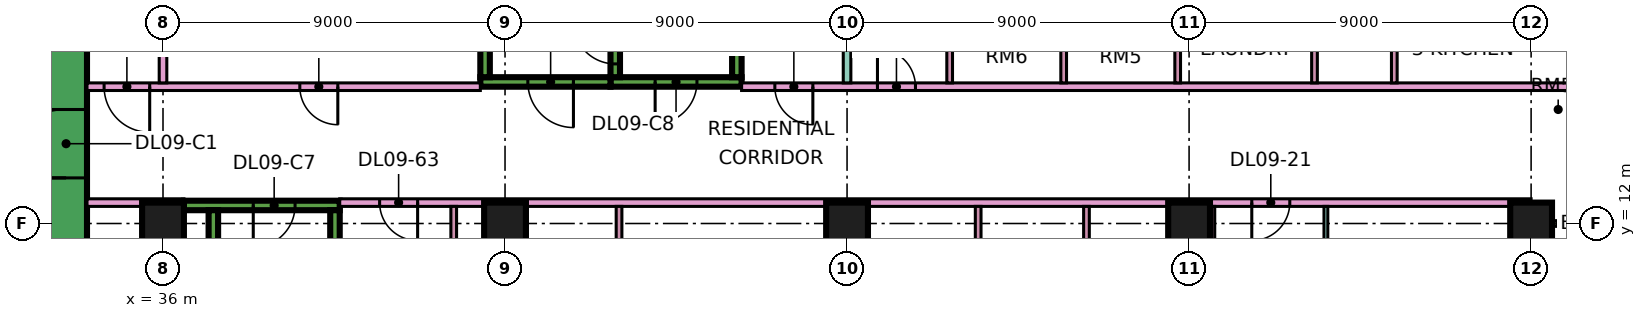
"""IFC4 building model, lengths in metres.
Left out: names, types, materials, properties, quantities, classifications, styles, units other than length and angle.
Written with IfcOpenShell. Run it as: python <this file> out.ifc"""

import sys

from ifc_helpers import new_model, si_unit, direction, frame, frame_2d, origin, origin_2d, place, context, subcontext, project, spatial, rectangle, extrude, element, fill, save


model = new_model("IFC4")
c1 = context("Model", 3, precision=1e-05, world=origin(), true_north=direction((0.0, 1.0)))
c2 = subcontext(c1, "Body", "Model", "MODEL_VIEW")
j1 = project(units=[si_unit("LENGTHUNIT", "METRE"), si_unit("PLANEANGLEUNIT", "RADIAN")], contexts=[c1])
p1 = place(None, origin())
s1 = spatial("IfcSite", under=j1, at=p1, CompositionType="ELEMENT")
p2 = place(p1, origin())
s2 = spatial("IfcBuilding", under=s1, at=p2, CompositionType="ELEMENT")
p3 = place(p2, frame((0.0, 0.0, 48.9)))
s3 = spatial("IfcBuildingStorey", under=s2, at=p3, CompositionType="ELEMENT", Elevation=48.9)
for number, where, z_axis, x_axis in (
    (1, (36.0, 12.0, 0.0), (0.0, 0.0, 1.0), (1.0, 0.0, 0.0)),
    (2, (45.0, 12.0, 0.0), (0.0, 0.0, 1.0), (1.0, 0.0, 0.0)),
    (3, (54.0, 12.0, 0.0), (0.0, 0.0, 1.0), (1.0, 0.0, 0.0)),
    (4, (63.0, 12.0, 0.0), (0.0, 0.0, 1.0), (1.0, 0.0, 0.0)),
    (5, (72.0, 12.0, 0.0), (0.0, 0.0, 1.0), (1.0, 0.0, 0.0)),
):
    element("IfcColumn", number, at=place(p3, frame(where, z_axis=z_axis, x_axis=x_axis)), inside=s3, PredefinedType="COLUMN", context=c2, shape_type="SweptSolid", body=[
        extrude(rectangle(XDim=1.1, YDim=1.1, at=origin_2d()), origin(), (0.0, 0.0, 1.0), 3.75),
    ])
p4 = place(p3, frame((33.45, 8.1, 0.0), z_axis=(0.0, 0.0, 1.0), x_axis=(0.0, 1.0, 0.0)))
e6 = element("IfcWall", 6, at=p4, inside=s3, PredefinedType="SHEAR", context=c2, shape_type="SweptSolid", body=[
    extrude(rectangle(XDim=10.8, YDim=1.1, at=frame_2d((5.4, 0.0))), origin(), (0.0, 0.0, 1.0), 3.75),
])
p5 = place(p4, frame((5.1, 0.0, 0.0)))
e7 = element("IfcOpeningElement", 7, at=p5, cuts=e6, PredefinedType="OPENING", context=c2, shape_type="SweptSolid", body=[
    extrude(rectangle(XDim=1.8, YDim=2.4, at=frame_2d((0.9, 1.2))), frame((0.0, 0.56, 0.0), z_axis=(0.0, -1.0, 0.0), x_axis=(1.0, 0.0, 0.0)), (0.0, 0.0, 1.0), 1.12),
])
p6 = place(p3, frame((36.55, 12.475, 0.0), z_axis=(0.0, 0.0, 1.0), x_axis=(1.0, 0.0, 0.0)))
e8 = element("IfcWall", 8, at=p6, inside=s3, PredefinedType="SHEAR", context=c2, shape_type="SweptSolid", body=[
    extrude(rectangle(XDim=4.1, YDim=0.25, at=frame_2d((2.05, 0.0))), origin(), (0.0, 0.0, 1.0), 3.75),
])
p7 = place(p6, frame((1.825, 0.0, 0.0)))
e9 = element("IfcOpeningElement", 9, at=p7, cuts=e8, PredefinedType="OPENING", context=c2, shape_type="SweptSolid", body=[
    extrude(rectangle(XDim=1.1, YDim=2.2, at=frame_2d((0.55, 1.1))), frame((0.0, 0.135, 0.0), z_axis=(0.0, -1.0, 0.0), x_axis=(1.0, 0.0, 0.0)), (0.0, 0.0, 1.0), 0.27),
])
for number, where, z_axis, x_axis in (
    (10, (37.325, 5.85, 0.0), (0.0, 0.0, 1.0), (0.0, 1.0, 0.0)),
    (11, (40.525, 5.85, 0.0), (0.0, 0.0, 1.0), (0.0, 1.0, 0.0)),
):
    element("IfcWall", number, at=place(p3, frame(where, z_axis=z_axis, x_axis=x_axis)), inside=s3, PredefinedType="SHEAR", context=c2, shape_type="SweptSolid", body=[
        extrude(rectangle(XDim=6.5, YDim=0.25, at=frame_2d((3.25, 0.0))), origin(), (0.0, 0.0, 1.0), 3.75),
    ])
p8 = place(p3, frame((47.775, 15.725, 0.0), z_axis=(0.0, 0.0, 1.0), x_axis=(1.0, 0.0, 0.0)))
e12 = element("IfcWall", 12, at=p8, inside=s3, PredefinedType="SHEAR", context=c2, shape_type="SweptSolid", body=[
    extrude(rectangle(XDim=3.45, YDim=0.25, at=frame_2d((1.725, 0.0))), origin(), (0.0, 0.0, 1.0), 3.75),
])
p9 = place(p8, frame((1.175, 0.0, 0.0)))
e13 = element("IfcOpeningElement", 13, at=p9, cuts=e12, PredefinedType="OPENING", context=c2, shape_type="SweptSolid", body=[
    extrude(rectangle(XDim=1.1, YDim=2.2, at=frame_2d((0.55, 1.1))), frame((0.0, 0.135, 0.0), z_axis=(0.0, -1.0, 0.0), x_axis=(1.0, 0.0, 0.0)), (0.0, 0.0, 1.0), 0.27),
])
p10 = place(p3, frame((47.9, 15.85, 0.0), z_axis=(0.0, 0.0, 1.0), x_axis=(0.0, 1.0, 0.0)))
e14 = element("IfcWall", 14, at=p10, inside=s3, PredefinedType="SHEAR", context=c2, shape_type="SweptSolid", body=[
    extrude(rectangle(XDim=6.5, YDim=0.25, at=frame_2d((3.25, 0.0))), origin(), (0.0, 0.0, 1.0), 3.75),
])
p11 = place(p10, frame((0.35, 0.0, 0.0)))
e15 = element("IfcOpeningElement", 15, at=p11, cuts=e14, PredefinedType="OPENING", context=c2, shape_type="SweptSolid", body=[
    extrude(rectangle(XDim=1.1, YDim=2.2, at=frame_2d((0.55, 1.1))), frame((0.0, 0.135, 0.0), z_axis=(0.0, -1.0, 0.0), x_axis=(1.0, 0.0, 0.0)), (0.0, 0.0, 1.0), 0.27),
])
p12 = place(p3, frame((51.1, 15.85, 0.0), z_axis=(0.0, 0.0, 1.0), x_axis=(0.0, 1.0, 0.0)))
e16 = element("IfcWall", 16, at=p12, inside=s3, PredefinedType="SHEAR", context=c2, shape_type="SweptSolid", body=[
    extrude(rectangle(XDim=6.5, YDim=0.25, at=frame_2d((3.25, 0.0))), origin(), (0.0, 0.0, 1.0), 3.75),
])
p13 = place(p3, frame((44.35, 15.725, 0.0), z_axis=(0.0, 0.0, 1.0), x_axis=(1.0, 0.0, 0.0)))
e17 = element("IfcWall", 17, at=p13, inside=s3, PredefinedType="SHEAR", context=c2, shape_type="SweptSolid", body=[
    extrude(rectangle(XDim=3.425, YDim=0.25, at=frame_2d((1.712, 0.0))), origin(), (0.0, 0.0, 1.0), 3.75),
])
p14 = place(p13, frame((1.25, 0.0, 0.0)))
e18 = element("IfcOpeningElement", 18, at=p14, cuts=e17, PredefinedType="OPENING", context=c2, shape_type="SweptSolid", body=[
    extrude(rectangle(XDim=1.2, YDim=2.2, at=frame_2d((0.6, 1.1))), frame((0.0, 0.135, 0.0), z_axis=(0.0, -1.0, 0.0), x_axis=(1.0, 0.0, 0.0)), (0.0, 0.0, 1.0), 0.27),
])
p15 = place(p3, frame((44.475, 15.85, 0.0), z_axis=(0.0, 0.0, 1.0), x_axis=(0.0, 1.0, 0.0)))
e19 = element("IfcWall", 19, at=p15, inside=s3, PredefinedType="SHEAR", context=c2, shape_type="SweptSolid", body=[
    extrude(rectangle(XDim=6.5, YDim=0.25, at=frame_2d((3.25, 0.0))), origin(), (0.0, 0.0, 1.0), 3.75),
])
p16 = place(p15, frame((1.75, 0.0, 0.0)))
e20 = element("IfcOpeningElement", 20, at=p16, cuts=e19, PredefinedType="OPENING", context=c2, shape_type="SweptSolid", body=[
    extrude(rectangle(XDim=1.1, YDim=2.2, at=frame_2d((0.55, 1.1))), frame((0.0, 0.135, 0.0), z_axis=(0.0, -1.0, 0.0), x_axis=(1.0, 0.0, 0.0)), (0.0, 0.0, 1.0), 0.27),
])
p17 = place(p15, frame((4.3, 0.0, 0.0)))
e21 = element("IfcOpeningElement", 21, at=p17, cuts=e19, PredefinedType="OPENING", context=c2, shape_type="SweptSolid", body=[
    extrude(rectangle(XDim=1.1, YDim=2.2, at=frame_2d((0.55, 1.1))), frame((0.0, 0.135, 0.0), z_axis=(0.0, -1.0, 0.0), x_axis=(1.0, 0.0, 0.0)), (0.0, 0.0, 1.0), 0.27),
])
p18 = place(p3, frame((72.0, 1.575, 0.0), z_axis=(0.0, 0.0, 1.0), x_axis=(0.0, 1.0, 0.0)))
e22 = element("IfcWall", 22, at=p18, inside=s3, PredefinedType="SOLIDWALL", context=c2, shape_type="SweptSolid", body=[
    extrude(rectangle(XDim=10.35, YDim=0.15, at=frame_2d((5.175, 0.0))), origin(), (0.0, 0.0, 1.0), 3.35),
])
p19 = place(p18, frame((1.288, 0.0, 0.0)))
e23 = element("IfcOpeningElement", 23, at=p19, cuts=e22, PredefinedType="OPENING", context=c2, shape_type="SweptSolid", body=[
    extrude(rectangle(XDim=1.8, YDim=2.4, at=frame_2d((0.9, 1.2))), frame((0.0, 0.085, 0.0), z_axis=(0.0, -1.0, 0.0), x_axis=(1.0, 0.0, 0.0)), (0.0, 0.0, 1.0), 0.17),
])
p20 = place(p18, frame((6.175, 0.0, 0.45)))
e24 = element("IfcOpeningElement", 24, at=p20, cuts=e22, PredefinedType="OPENING", context=c2, shape_type="SweptSolid", body=[
    extrude(rectangle(XDim=3.0, YDim=2.4, at=frame_2d((1.5, 1.2))), frame((0.0, 0.085, 0.0), z_axis=(0.0, -1.0, 0.0), x_axis=(1.0, 0.0, 0.0)), (0.0, 0.0, 1.0), 0.17),
])
p21 = place(p3, frame((73.5, 12.0, 0.0), z_axis=(0.0, 0.0, 1.0), x_axis=(-1.0, 0.0, 0.0)))
e25 = element("IfcWall", 25, at=p21, inside=s3, PredefinedType="SOLIDWALL", context=c2, shape_type="SweptSolid", body=[
    extrude(rectangle(XDim=1.5, YDim=0.15, at=frame_2d((0.75, 0.0))), origin(), (0.0, 0.0, 1.0), 3.35),
])
p22 = place(p3, frame((34.0, 12.55, 0.0), z_axis=(0.0, 0.0, 1.0), x_axis=(1.0, 0.0, 0.0)))
e26 = element("IfcWall", 26, at=p22, inside=s3, PredefinedType="PARTITIONING", context=c2, shape_type="SweptSolid", body=[
    extrude(rectangle(XDim=2.551, YDim=0.2, at=frame_2d((1.275, 0.0))), origin(), (0.0, 0.0, 1.0), 3.35),
])
p23 = place(p3, frame((34.0, 15.6, 0.0), z_axis=(0.0, 0.0, 1.0), x_axis=(1.0, 0.0, 0.0)))
e27 = element("IfcWall", 27, at=p23, inside=s3, PredefinedType="PARTITIONING", context=c2, shape_type="SweptSolid", body=[
    extrude(rectangle(XDim=10.35, YDim=0.2, at=frame_2d((5.175, 0.0))), origin(), (0.0, 0.0, 1.0), 3.35),
])
p24 = place(p23, frame((5.6, 0.0, 0.0)))
e28 = element("IfcOpeningElement", 28, at=p24, cuts=e27, PredefinedType="OPENING", context=c2, shape_type="SweptSolid", body=[
    extrude(rectangle(XDim=1.0, YDim=2.1, at=frame_2d((0.5, 1.05))), frame((0.0, 0.11, 0.0), z_axis=(0.0, -1.0, 0.0), x_axis=(1.0, 0.0, 0.0)), (0.0, 0.0, 1.0), 0.22),
])
p25 = place(p23, frame((0.45, 0.0, 0.0)))
e29 = element("IfcOpeningElement", 29, at=p25, cuts=e27, PredefinedType="OPENING", context=c2, shape_type="SweptSolid", body=[
    extrude(rectangle(XDim=1.2, YDim=2.1, at=frame_2d((0.6, 1.05))), frame((0.0, 0.11, 0.0), z_axis=(0.0, -1.0, 0.0), x_axis=(1.0, 0.0, 0.0)), (0.0, 0.0, 1.0), 0.22),
])
p26 = place(p3, frame((36.0, 15.7, 0.0), z_axis=(0.0, 0.0, 1.0), x_axis=(0.0, 1.0, 0.0)))
e30 = element("IfcWall", 30, at=p26, inside=s3, PredefinedType="PARTITIONING", context=c2, shape_type="SweptSolid", body=[
    extrude(rectangle(XDim=8.3, YDim=0.2, at=frame_2d((4.15, 0.0))), origin(), (0.0, 0.0, 1.0), 3.35),
])
p27 = place(p3, frame((40.65, 12.55, 0.0), z_axis=(0.0, 0.0, 1.0), x_axis=(1.0, 0.0, 0.0)))
e31 = element("IfcWall", 31, at=p27, inside=s3, PredefinedType="PARTITIONING", context=c2, shape_type="SweptSolid", body=[
    extrude(rectangle(XDim=31.35, YDim=0.2, at=frame_2d((15.675, 0.0))), origin(), (0.0, 0.0, 1.0), 3.35),
])
p28 = place(p27, frame((24.0, 0.0, 0.0)))
e32 = element("IfcOpeningElement", 32, at=p28, cuts=e31, PredefinedType="OPENING", context=c2, shape_type="SweptSolid", body=[
    extrude(rectangle(XDim=1.0, YDim=2.1, at=frame_2d((0.5, 1.05))), frame((0.0, 0.11, 0.0), z_axis=(0.0, -1.0, 0.0), x_axis=(1.0, 0.0, 0.0)), (0.0, 0.0, 1.0), 0.22),
])
p29 = place(p27, frame((1.05, 0.0, 0.0)))
e33 = element("IfcOpeningElement", 33, at=p29, cuts=e31, PredefinedType="OPENING", context=c2, shape_type="SweptSolid", body=[
    extrude(rectangle(XDim=1.0, YDim=2.1, at=frame_2d((0.5, 1.05))), frame((0.0, 0.11, 0.0), z_axis=(0.0, -1.0, 0.0), x_axis=(1.0, 0.0, 0.0)), (0.0, 0.0, 1.0), 0.22),
])
p30 = place(p3, frame((43.65, 5.975, 0.0), z_axis=(0.0, 0.0, 1.0), x_axis=(0.0, 1.0, 0.0)))
e34 = element("IfcWall", 34, at=p30, inside=s3, PredefinedType="PARTITIONING", context=c2, shape_type="SweptSolid", body=[
    extrude(rectangle(XDim=6.475, YDim=0.15, at=frame_2d((3.237, 0.0))), origin(), (0.0, 0.0, 1.0), 3.35),
])
p31 = place(p30, frame((4.275, 0.0, 0.0)))
e35 = element("IfcOpeningElement", 35, at=p31, cuts=e34, PredefinedType="OPENING", context=c2, shape_type="SweptSolid", body=[
    extrude(rectangle(XDim=0.9, YDim=2.1, at=frame_2d((0.45, 1.05))), frame((0.0, 0.085, 0.0), z_axis=(0.0, -1.0, 0.0), x_axis=(1.0, 0.0, 0.0)), (0.0, 0.0, 1.0), 0.17),
])
p32 = place(p3, frame((48.0, 5.975, 0.0), z_axis=(0.0, 0.0, 1.0), x_axis=(0.0, 1.0, 0.0)))
e36 = element("IfcWall", 36, at=p32, inside=s3, PredefinedType="PARTITIONING", context=c2, shape_type="SweptSolid", body=[
    extrude(rectangle(XDim=6.475, YDim=0.15, at=frame_2d((3.237, 0.0))), origin(), (0.0, 0.0, 1.0), 3.35),
])
p33 = place(p3, frame((51.225, 15.6, 0.0), z_axis=(0.0, 0.0, 1.0), x_axis=(1.0, 0.0, 0.0)))
e37 = element("IfcWall", 37, at=p33, inside=s3, PredefinedType="PARTITIONING", context=c2, shape_type="SweptSolid", body=[
    extrude(rectangle(XDim=22.125, YDim=0.2, at=frame_2d((11.062, 0.0))), origin(), (0.0, 0.0, 1.0), 3.35),
])
p34 = place(p33, frame((3.575, 0.0, 0.0)))
e38 = element("IfcOpeningElement", 38, at=p34, cuts=e37, PredefinedType="OPENING", context=c2, shape_type="SweptSolid", body=[
    extrude(rectangle(XDim=1.0, YDim=2.1, at=frame_2d((0.5, 1.05))), frame((0.0, 0.11, 0.0), z_axis=(0.0, -1.0, 0.0), x_axis=(1.0, 0.0, 0.0)), (0.0, 0.0, 1.0), 0.22),
])
p35 = place(p33, frame((0.875, 0.0, 0.0)))
e39 = element("IfcOpeningElement", 39, at=p35, cuts=e37, PredefinedType="OPENING", context=c2, shape_type="SweptSolid", body=[
    extrude(rectangle(XDim=1.0, YDim=2.1, at=frame_2d((0.5, 1.05))), frame((0.0, 0.11, 0.0), z_axis=(0.0, -1.0, 0.0), x_axis=(1.0, 0.0, 0.0)), (0.0, 0.0, 1.0), 0.22),
])
p36 = place(p3, frame((54.0, 5.9, 0.0), z_axis=(0.0, 0.0, 1.0), x_axis=(0.0, 1.0, 0.0)))
e40 = element("IfcWall", 40, at=p36, inside=s3, PredefinedType="PARTITIONING", context=c2, shape_type="SweptSolid", body=[
    extrude(rectangle(XDim=6.55, YDim=0.2, at=frame_2d((3.275, 0.0))), origin(), (0.0, 0.0, 1.0), 3.35),
])
p37 = place(p3, frame((54.0, 15.7, 0.0), z_axis=(0.0, 0.0, 1.0), x_axis=(0.0, 1.0, 0.0)))
e41 = element("IfcWall", 41, at=p37, inside=s3, PredefinedType="PARTITIONING", context=c2, shape_type="SweptSolid", body=[
    extrude(rectangle(XDim=8.226, YDim=0.2, at=frame_2d((4.113, 0.0))), origin(), (0.0, 0.0, 1.0), 3.35),
])
p38 = place(p3, frame((56.7, 15.7, 0.0), z_axis=(0.0, 0.0, 1.0), x_axis=(0.0, 1.0, 0.0)))
e42 = element("IfcWall", 42, at=p38, inside=s3, PredefinedType="PARTITIONING", context=c2, shape_type="SweptSolid", body=[
    extrude(rectangle(XDim=2.525, YDim=0.15, at=frame_2d((1.263, 0.0))), origin(), (0.0, 0.0, 1.0), 3.35),
])
p39 = place(p3, frame((57.45, 7.225, 0.0), z_axis=(0.0, 0.0, 1.0), x_axis=(0.0, 1.0, 0.0)))
e43 = element("IfcWall", 43, at=p39, inside=s3, PredefinedType="PARTITIONING", context=c2, shape_type="SweptSolid", body=[
    extrude(rectangle(XDim=5.225, YDim=0.15, at=frame_2d((2.612, 0.0))), origin(), (0.0, 0.0, 1.0), 3.35),
])
p40 = place(p3, frame((59.7, 15.7, 0.0), z_axis=(0.0, 0.0, 1.0), x_axis=(0.0, 1.0, 0.0)))
e44 = element("IfcWall", 44, at=p40, inside=s3, PredefinedType="PARTITIONING", context=c2, shape_type="SweptSolid", body=[
    extrude(rectangle(XDim=2.525, YDim=0.15, at=frame_2d((1.263, 0.0))), origin(), (0.0, 0.0, 1.0), 3.35),
])
p41 = place(p3, frame((60.3, 7.225, 0.0), z_axis=(0.0, 0.0, 1.0), x_axis=(0.0, 1.0, 0.0)))
e45 = element("IfcWall", 45, at=p41, inside=s3, PredefinedType="PARTITIONING", context=c2, shape_type="SweptSolid", body=[
    extrude(rectangle(XDim=5.225, YDim=0.15, at=frame_2d((2.612, 0.0))), origin(), (0.0, 0.0, 1.0), 3.35),
])
p42 = place(p3, frame((62.7, 15.7, 0.0), z_axis=(0.0, 0.0, 1.0), x_axis=(0.0, 1.0, 0.0)))
e46 = element("IfcWall", 46, at=p42, inside=s3, PredefinedType="PARTITIONING", context=c2, shape_type="SweptSolid", body=[
    extrude(rectangle(XDim=2.525, YDim=0.15, at=frame_2d((1.263, 0.0))), origin(), (0.0, 0.0, 1.0), 3.35),
])
p43 = place(p3, frame((63.6, 7.225, 0.0), z_axis=(0.0, 0.0, 1.0), x_axis=(0.0, 1.0, 0.0)))
e47 = element("IfcWall", 47, at=p43, inside=s3, PredefinedType="PARTITIONING", context=c2, shape_type="SweptSolid", body=[
    extrude(rectangle(XDim=5.225, YDim=0.15, at=frame_2d((2.612, 0.0))), origin(), (0.0, 0.0, 1.0), 3.35),
])
p44 = place(p3, frame((66.3, 15.7, 0.0), z_axis=(0.0, 0.0, 1.0), x_axis=(0.0, 1.0, 0.0)))
e48 = element("IfcWall", 48, at=p44, inside=s3, PredefinedType="PARTITIONING", context=c2, shape_type="SweptSolid", body=[
    extrude(rectangle(XDim=2.525, YDim=0.15, at=frame_2d((1.263, 0.0))), origin(), (0.0, 0.0, 1.0), 3.35),
])
p45 = place(p3, frame((66.6, 7.1, 0.0), z_axis=(0.0, 0.0, 1.0), x_axis=(0.0, 1.0, 0.0)))
e49 = element("IfcWall", 49, at=p45, inside=s3, PredefinedType="PARTITIONING", context=c2, shape_type="SweptSolid", body=[
    extrude(rectangle(XDim=5.35, YDim=0.1, at=frame_2d((2.675, 0.0))), origin(), (0.0, 0.0, 1.0), 3.35),
])
p46 = place(p45, frame((2.3, 0.0, 0.0)))
e50 = element("IfcOpeningElement", 50, at=p46, cuts=e49, PredefinedType="OPENING", context=c2, shape_type="SweptSolid", body=[
    extrude(rectangle(XDim=0.9, YDim=2.1, at=frame_2d((0.45, 1.05))), frame((0.0, 0.06, 0.0), z_axis=(0.0, -1.0, 0.0), x_axis=(1.0, 0.0, 0.0)), (0.0, 0.0, 1.0), 0.12),
])
p47 = place(p3, frame((68.4, 15.7, 0.0), z_axis=(0.0, 0.0, 1.0), x_axis=(0.0, 1.0, 0.0)))
e51 = element("IfcWall", 51, at=p47, inside=s3, PredefinedType="PARTITIONING", context=c2, shape_type="SweptSolid", body=[
    extrude(rectangle(XDim=2.525, YDim=0.15, at=frame_2d((1.263, 0.0))), origin(), (0.0, 0.0, 1.0), 3.35),
])
p48 = place(p5, origin())
e52 = element("IfcDoor", 52, at=p48, inside=s3, OperationType="DOUBLE_DOOR_SINGLE_SWING", PredefinedType="DOOR", context=c2, shape_type="SweptSolid", body=[
    extrude(rectangle(XDim=1.8, YDim=2.4, at=frame_2d((0.9, 1.2))), frame((0.0, 0.025, 0.0), z_axis=(0.0, -1.0, 0.0), x_axis=(1.0, 0.0, 0.0)), (0.0, 0.0, 1.0), 0.05),
])
fill(e7, e52)
p49 = place(p7, frame((1.1, 0.0, 0.0), z_axis=(0.0, 0.0, 1.0), x_axis=(-1.0, 0.0, 0.0)))
e53 = element("IfcDoor", 53, at=p49, inside=s3, OperationType="SINGLE_SWING_LEFT", PredefinedType="DOOR", context=c2, shape_type="SweptSolid", body=[
    extrude(rectangle(XDim=1.1, YDim=2.2, at=frame_2d((0.55, 1.1))), frame((0.0, 0.025, 0.0), z_axis=(0.0, -1.0, 0.0), x_axis=(1.0, 0.0, 0.0)), (0.0, 0.0, 1.0), 0.05),
])
fill(e9, e53)
p50 = place(p9, frame((1.1, 0.0, 0.0), z_axis=(0.0, 0.0, 1.0), x_axis=(-1.0, 0.0, 0.0)))
e54 = element("IfcDoor", 54, at=p50, inside=s3, OperationType="SINGLE_SWING_LEFT", PredefinedType="DOOR", context=c2, shape_type="SweptSolid", body=[
    extrude(rectangle(XDim=1.1, YDim=2.2, at=frame_2d((0.55, 1.1))), frame((0.0, 0.025, 0.0), z_axis=(0.0, -1.0, 0.0), x_axis=(1.0, 0.0, 0.0)), (0.0, 0.0, 1.0), 0.05),
])
fill(e13, e54)
p51 = place(p14, origin())
e55 = element("IfcDoor", 55, at=p51, inside=s3, OperationType="SINGLE_SWING_RIGHT", PredefinedType="DOOR", context=c2, shape_type="SweptSolid", body=[
    extrude(rectangle(XDim=1.2, YDim=2.2, at=frame_2d((0.6, 1.1))), frame((0.0, 0.025, 0.0), z_axis=(0.0, -1.0, 0.0), x_axis=(1.0, 0.0, 0.0)), (0.0, 0.0, 1.0), 0.05),
])
fill(e18, e55)
p52 = place(p11, frame((1.1, 0.0, 0.0), z_axis=(0.0, 0.0, 1.0), x_axis=(-1.0, 0.0, 0.0)))
e56 = element("IfcDoor", 56, at=p52, inside=s3, OperationType="SINGLE_SWING_RIGHT", PredefinedType="DOOR", context=c2, shape_type="SweptSolid", body=[
    extrude(rectangle(XDim=1.1, YDim=2.2, at=frame_2d((0.55, 1.1))), frame((0.0, 0.025, 0.0), z_axis=(0.0, -1.0, 0.0), x_axis=(1.0, 0.0, 0.0)), (0.0, 0.0, 1.0), 0.05),
])
fill(e15, e56)
p53 = place(p24, origin())
e57 = element("IfcDoor", 57, at=p53, inside=s3, OperationType="SINGLE_SWING_RIGHT", PredefinedType="DOOR", context=c2, shape_type="SweptSolid", body=[
    extrude(rectangle(XDim=1.0, YDim=2.1, at=frame_2d((0.5, 1.05))), frame((0.0, 0.025, 0.0), z_axis=(0.0, -1.0, 0.0), x_axis=(1.0, 0.0, 0.0)), (0.0, 0.0, 1.0), 0.05),
])
fill(e28, e57)
p54 = place(p34, origin())
e58 = element("IfcDoor", 58, at=p54, inside=s3, OperationType="SINGLE_SWING_LEFT", PredefinedType="DOOR", context=c2, shape_type="SweptSolid", body=[
    extrude(rectangle(XDim=1.0, YDim=2.1, at=frame_2d((0.5, 1.05))), frame((0.0, 0.025, 0.0), z_axis=(0.0, -1.0, 0.0), x_axis=(1.0, 0.0, 0.0)), (0.0, 0.0, 1.0), 0.05),
])
fill(e38, e58)
p55 = place(p28, frame((1.0, 0.0, 0.0), z_axis=(0.0, 0.0, 1.0), x_axis=(-1.0, 0.0, 0.0)))
e59 = element("IfcDoor", 59, at=p55, inside=s3, OperationType="SINGLE_SWING_LEFT", PredefinedType="DOOR", context=c2, shape_type="SweptSolid", body=[
    extrude(rectangle(XDim=1.0, YDim=2.1, at=frame_2d((0.5, 1.05))), frame((0.0, 0.025, 0.0), z_axis=(0.0, -1.0, 0.0), x_axis=(1.0, 0.0, 0.0)), (0.0, 0.0, 1.0), 0.05),
])
fill(e32, e59)
p56 = place(p25, origin())
e60 = element("IfcDoor", 60, at=p56, inside=s3, OperationType="SINGLE_SWING_RIGHT", PredefinedType="DOOR", context=c2, shape_type="SweptSolid", body=[
    extrude(rectangle(XDim=1.2, YDim=2.1, at=frame_2d((0.6, 1.05))), frame((0.0, 0.025, 0.0), z_axis=(0.0, -1.0, 0.0), x_axis=(1.0, 0.0, 0.0)), (0.0, 0.0, 1.0), 0.05),
])
fill(e29, e60)
p57 = place(p35, origin())
e61 = element("IfcDoor", 61, at=p57, inside=s3, OperationType="SINGLE_SWING_RIGHT", PredefinedType="DOOR", context=c2, shape_type="SweptSolid", body=[
    extrude(rectangle(XDim=1.0, YDim=2.1, at=frame_2d((0.5, 1.05))), frame((0.0, 0.025, 0.0), z_axis=(0.0, -1.0, 0.0), x_axis=(1.0, 0.0, 0.0)), (0.0, 0.0, 1.0), 0.05),
])
fill(e39, e61)
p58 = place(p29, origin())
e62 = element("IfcDoor", 62, at=p58, inside=s3, OperationType="SINGLE_SWING_RIGHT", PredefinedType="DOOR", context=c2, shape_type="SweptSolid", body=[
    extrude(rectangle(XDim=1.0, YDim=2.1, at=frame_2d((0.5, 1.05))), frame((0.0, 0.025, 0.0), z_axis=(0.0, -1.0, 0.0), x_axis=(1.0, 0.0, 0.0)), (0.0, 0.0, 1.0), 0.05),
])
fill(e33, e62)
save(model, sys.argv[1])
